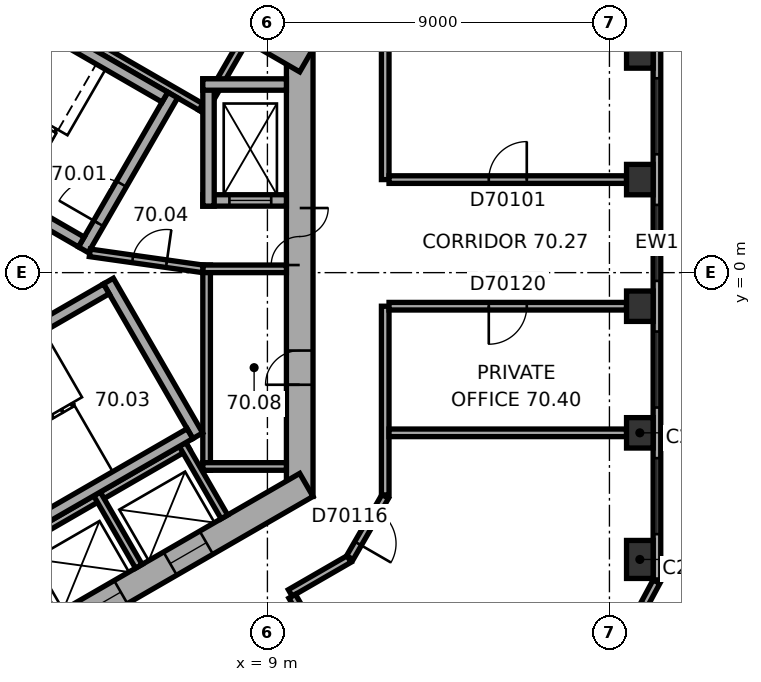
"""IFC4 building model, lengths in metres.
Left out: names, types, materials, properties, quantities, classifications, styles, units other than length and angle.
Written with IfcOpenShell. Run it as: python <this file> out.ifc"""

import sys

from ifc_helpers import new_model, si_unit, direction, frame, frame_2d, origin, origin_2d, place, context, subcontext, project, spatial, rectangle, extrude, element, fill, save


model = new_model("IFC4")
c1 = context("Model", 3, precision=1e-05, world=origin(), true_north=direction((0.0, 1.0)))
c2 = subcontext(c1, "Body", "Model", "MODEL_VIEW")
j1 = project(units=[si_unit("LENGTHUNIT", "METRE"), si_unit("PLANEANGLEUNIT", "RADIAN")], contexts=[c1])
p1 = place(None, origin())
s1 = spatial("IfcSite", under=j1, at=p1, CompositionType="ELEMENT")
p2 = place(p1, origin())
s2 = spatial("IfcBuilding", under=s1, at=p2, CompositionType="ELEMENT")
p3 = place(p2, frame((0.0, 0.0, 285.7)))
s3 = spatial("IfcBuildingStorey", under=s2, at=p3, CompositionType="ELEMENT", Elevation=285.7)
p4 = place(p3, frame((18.8, -7.547, 0.0), z_axis=(0.0, 0.0, 1.0), x_axis=(0.0, 1.0, 0.0)))
e1 = element("IfcColumn", 1, at=p4, inside=s3, PredefinedType="COLUMN", context=c2, shape_type="SweptSolid", body=[
    extrude(rectangle(XDim=1.0, YDim=0.7, at=origin_2d()), origin(), (0.0, 0.0, 1.0), 3.7),
])
for number, where, z_axis, x_axis in (
    (2, (18.8, -4.215, 0.0), (0.0, 0.0, 1.0), (0.0, 1.0, 0.0)),
    (3, (18.8, -0.883, 0.0), (0.0, 0.0, 1.0), (0.0, 1.0, 0.0)),
    (4, (18.8, 2.448, 0.0), (0.0, 0.0, 1.0), (0.0, 1.0, 0.0)),
    (5, (18.8, 5.78, 0.0), (0.0, 0.0, 1.0), (0.0, 1.0, 0.0)),
):
    element("IfcColumn", number, at=place(p3, frame(where, z_axis=z_axis, x_axis=x_axis)), inside=s3, PredefinedType="COLUMN", context=c2, shape_type="SweptSolid", body=[
        extrude(rectangle(XDim=0.8, YDim=0.7, at=origin_2d()), origin(), (0.0, 0.0, 1.0), 3.7),
    ])
p5 = place(p3, frame((9.85, -5.889, 0.0), z_axis=(0.0, 0.0, 1.0), x_axis=(0.0, 1.0, 0.0)))
e6 = element("IfcWall", 6, at=p5, inside=s3, PredefinedType="SHEAR", context=c2, shape_type="SweptSolid", body=[
    extrude(rectangle(XDim=11.778, YDim=0.7, at=frame_2d((5.889, 0.0))), origin(), (0.0, 0.0, 1.0), 3.7),
])
p6 = place(p5, frame((6.089, 0.0, 0.0)))
e7 = element("IfcOpeningElement", 7, at=p6, cuts=e6, PredefinedType="OPENING", context=c2, shape_type="SweptSolid", body=[
    extrude(rectangle(XDim=1.5, YDim=2.1, at=frame_2d((0.75, 1.05))), frame((0.0, 0.36, 0.0), z_axis=(0.0, -1.0, 0.0), x_axis=(1.0, 0.0, 0.0)), (0.0, 0.0, 1.0), 0.72),
])
p7 = place(p5, frame((2.939, 0.0, 0.0)))
e8 = element("IfcOpeningElement", 8, at=p7, cuts=e6, PredefinedType="OPENING", context=c2, shape_type="SweptSolid", body=[
    extrude(rectangle(XDim=0.9, YDim=2.1, at=frame_2d((0.45, 1.05))), frame((0.0, 0.36, 0.0), z_axis=(0.0, -1.0, 0.0), x_axis=(1.0, 0.0, 0.0)), (0.0, 0.0, 1.0), 0.72),
])
p8 = place(p3, frame((10.025, 5.586, 0.0), z_axis=(0.0, 0.0, 1.0), x_axis=(-0.866026453023, 0.499998182661, 0.0)))
e9 = element("IfcWall", 9, at=p8, inside=s3, PredefinedType="SHEAR", context=c2, shape_type="SweptSolid", body=[
    extrude(rectangle(XDim=11.778, YDim=0.7, at=frame_2d((5.889, 0.0))), origin(), (0.0, 0.0, 1.0), 3.7),
])
p9 = place(p8, frame((5.139, 0.0, 0.0)))
e10 = element("IfcOpeningElement", 10, at=p9, cuts=e9, PredefinedType="OPENING", context=c2, shape_type="SweptSolid", body=[
    extrude(rectangle(XDim=0.9, YDim=2.1, at=frame_2d((0.45, 1.05))), frame((0.0, 0.36, 0.0), z_axis=(0.0, -1.0, 0.0), x_axis=(1.0, 0.0, 0.0)), (0.0, 0.0, 1.0), 0.72),
])
p10 = place(p3, frame((-0.175, -11.475, 0.0), z_axis=(0.0, 0.0, 1.0), x_axis=(0.866026453023, 0.499998182661, 0.0)))
e11 = element("IfcWall", 11, at=p10, inside=s3, PredefinedType="SHEAR", context=c2, shape_type="SweptSolid", body=[
    extrude(rectangle(XDim=11.778, YDim=0.7, at=frame_2d((5.889, 0.0))), origin(), (0.0, 0.0, 1.0), 3.7),
])
p11 = place(p10, frame((2.439, 0.0, 0.0)))
e12 = element("IfcOpeningElement", 12, at=p11, cuts=e11, PredefinedType="OPENING", context=c2, shape_type="SweptSolid", body=[
    extrude(rectangle(XDim=1.1, YDim=2.1, at=frame_2d((0.55, 1.05))), frame((0.0, 0.36, 0.0), z_axis=(0.0, -1.0, 0.0), x_axis=(1.0, 0.0, 0.0)), (0.0, 0.0, 1.0), 0.72),
])
p12 = place(p10, frame((5.039, 0.0, 0.0)))
e13 = element("IfcOpeningElement", 13, at=p12, cuts=e11, PredefinedType="OPENING", context=c2, shape_type="SweptSolid", body=[
    extrude(rectangle(XDim=1.1, YDim=2.1, at=frame_2d((0.55, 1.05))), frame((0.0, 0.36, 0.0), z_axis=(0.0, -1.0, 0.0), x_axis=(1.0, 0.0, 0.0)), (0.0, 0.0, 1.0), 0.72),
])
p13 = place(p10, frame((7.639, 0.0, 0.0)))
e14 = element("IfcOpeningElement", 14, at=p13, cuts=e11, PredefinedType="OPENING", context=c2, shape_type="SweptSolid", body=[
    extrude(rectangle(XDim=1.1, YDim=2.1, at=frame_2d((0.55, 1.05))), frame((0.0, 0.36, 0.0), z_axis=(0.0, -1.0, 0.0), x_axis=(1.0, 0.0, 0.0)), (0.0, 0.0, 1.0), 0.72),
])
p14 = place(p3, frame((19.25, -8.084, 0.0), z_axis=(0.0, 0.0, 1.0), x_axis=(0.0, 1.0, 0.0)))
e15 = element("IfcWall", 15, at=p14, inside=s3, PredefinedType="STANDARD", context=c2, shape_type="SweptSolid", body=[
    extrude(rectangle(XDim=17.731, YDim=0.2, at=frame_2d((8.866, 0.0))), origin(), (0.0, 0.0, 1.0), 3.7),
])
p15 = place(p14, frame((1.203, 0.0, 0.9)))
e16 = element("IfcOpeningElement", 16, at=p15, cuts=e15, PredefinedType="OPENING", context=c2, shape_type="SweptSolid", body=[
    extrude(rectangle(XDim=2.0, YDim=2.0, at=frame_2d((1.0, 1.0))), frame((0.0, 0.11, 0.0), z_axis=(0.0, -1.0, 0.0), x_axis=(1.0, 0.0, 0.0)), (0.0, 0.0, 1.0), 0.22),
])
p16 = place(p14, frame((4.535, 0.0, 0.9)))
e17 = element("IfcOpeningElement", 17, at=p16, cuts=e15, PredefinedType="OPENING", context=c2, shape_type="SweptSolid", body=[
    extrude(rectangle(XDim=2.0, YDim=2.0, at=frame_2d((1.0, 1.0))), frame((0.0, 0.11, 0.0), z_axis=(0.0, -1.0, 0.0), x_axis=(1.0, 0.0, 0.0)), (0.0, 0.0, 1.0), 0.22),
])
p17 = place(p14, frame((7.866, 0.0, 0.9)))
e18 = element("IfcOpeningElement", 18, at=p17, cuts=e15, PredefinedType="OPENING", context=c2, shape_type="SweptSolid", body=[
    extrude(rectangle(XDim=2.0, YDim=2.0, at=frame_2d((1.0, 1.0))), frame((0.0, 0.11, 0.0), z_axis=(0.0, -1.0, 0.0), x_axis=(1.0, 0.0, 0.0)), (0.0, 0.0, 1.0), 0.22),
])
p18 = place(p14, frame((11.198, 0.0, 0.9)))
e19 = element("IfcOpeningElement", 19, at=p18, cuts=e15, PredefinedType="OPENING", context=c2, shape_type="SweptSolid", body=[
    extrude(rectangle(XDim=2.0, YDim=2.0, at=frame_2d((1.0, 1.0))), frame((0.0, 0.11, 0.0), z_axis=(0.0, -1.0, 0.0), x_axis=(1.0, 0.0, 0.0)), (0.0, 0.0, 1.0), 0.22),
])
p19 = place(p14, frame((14.53, 0.0, 0.9)))
e20 = element("IfcOpeningElement", 20, at=p19, cuts=e15, PredefinedType="OPENING", context=c2, shape_type="SweptSolid", body=[
    extrude(rectangle(XDim=2.0, YDim=2.0, at=frame_2d((1.0, 1.0))), frame((0.0, 0.11, 0.0), z_axis=(0.0, -1.0, 0.0), x_axis=(1.0, 0.0, 0.0)), (0.0, 0.0, 1.0), 0.22),
])
p20 = place(p3, frame((17.399, -11.554, 0.0), z_axis=(0.0, 0.0, 1.0), x_axis=(0.473309051311, 0.880896442238, 0.0)))
e21 = element("IfcWall", 21, at=p20, inside=s3, PredefinedType="STANDARD", context=c2, shape_type="SweptSolid", body=[
    extrude(rectangle(XDim=3.886, YDim=0.2, at=frame_2d((1.943, 0.0))), origin(), (0.0, 0.0, 1.0), 3.7),
])
p21 = place(p20, frame((0.643, 0.0, 0.9)))
e22 = element("IfcOpeningElement", 22, at=p21, cuts=e21, PredefinedType="OPENING", context=c2, shape_type="SweptSolid", body=[
    extrude(rectangle(XDim=2.6, YDim=2.0, at=frame_2d((1.3, 1.0))), frame((0.0, 0.11, 0.0), z_axis=(0.0, -1.0, 0.0), x_axis=(1.0, 0.0, 0.0)), (0.0, 0.0, 1.0), 0.22),
])
p22 = place(p3, frame((7.4, -5.2, 0.0), z_axis=(0.0, 0.0, 1.0), x_axis=(0.0, 1.0, 0.0)))
e23 = element("IfcWall", 23, at=p22, inside=s3, PredefinedType="PARTITIONING", context=c2, shape_type="SweptSolid", body=[
    extrude(rectangle(XDim=5.4, YDim=0.2, at=frame_2d((2.7, 0.0))), origin(), (0.0, 0.0, 1.0), 3.42),
])
for number, where, z_axis, x_axis in (
    (24, (7.3, -5.1, 0.0), (0.0, 0.0, 1.0), (1.0, 0.0, 0.0)),
    (25, (7.3, 0.1, 0.0), (0.0, 0.0, 1.0), (1.0, 0.0, 0.0)),
):
    element("IfcWall", number, at=place(p3, frame(where, z_axis=z_axis, x_axis=x_axis)), inside=s3, PredefinedType="PARTITIONING", context=c2, shape_type="SweptSolid", body=[
        extrude(rectangle(XDim=2.2, YDim=0.2, at=frame_2d((1.1, 0.0))), origin(), (0.0, 0.0, 1.0), 3.42),
    ])
p23 = place(p3, frame((7.424, 4.259, 0.0), z_axis=(0.0, 0.0, 1.0), x_axis=(-0.866026010844, 0.49999894854, 0.0)))
e26 = element("IfcWall", 26, at=p23, inside=s3, PredefinedType="PARTITIONING", context=c2, shape_type="SweptSolid", body=[
    extrude(rectangle(XDim=8.0, YDim=0.2, at=frame_2d((4.0, 0.0))), origin(), (0.0, 0.0, 1.0), 3.42),
])
p24 = place(p3, frame((7.287, 4.222, 0.0), z_axis=(0.0, 0.0, 1.0), x_axis=(0.499946605688, 0.86605622881, 0.0)))
e27 = element("IfcWall", 27, at=p24, inside=s3, PredefinedType="PARTITIONING", context=c2, shape_type="SweptSolid", body=[
    extrude(rectangle(XDim=2.2, YDim=0.2, at=frame_2d((1.1, 0.0))), origin(), (0.0, 0.0, 1.0), 3.42),
])
p25 = place(p3, frame((-0.024, -8.559, 0.0), z_axis=(0.0, 0.0, 1.0), x_axis=(0.866026010844, 0.49999894854, 0.0)))
e28 = element("IfcWall", 28, at=p25, inside=s3, PredefinedType="PARTITIONING", context=c2, shape_type="SweptSolid", body=[
    extrude(rectangle(XDim=8.0, YDim=0.2, at=frame_2d((4.0, 0.0))), origin(), (0.0, 0.0, 1.0), 3.42),
])
for number, where, z_axis, x_axis in (
    (29, (2.264, -7.122, 0.0), (0.0, 0.0, 1.0), (0.5, -0.866, 0.0)),
    (30, (4.516, -5.822, 0.0), (0.0, 0.0, 1.0), (0.5, -0.866, 0.0)),
    (31, (6.768, -4.522, 0.0), (0.0, 0.0, 1.0), (0.5, -0.866, 0.0)),
):
    element("IfcWall", number, at=place(p3, frame(where, z_axis=z_axis, x_axis=x_axis)), inside=s3, PredefinedType="PARTITIONING", context=c2, shape_type="SweptSolid", body=[
        extrude(rectangle(XDim=2.2, YDim=0.2, at=frame_2d((1.1, 0.0))), origin(), (0.0, 0.0, 1.0), 3.42),
    ])
p26 = place(p3, frame((4.158, 0.602, 0.0), z_axis=(0.0, 0.0, 1.0), x_axis=(0.499977259774, 0.866038532462, 0.0)))
e32 = element("IfcWall", 32, at=p26, inside=s3, PredefinedType="SHEAR", context=c2, shape_type="SweptSolid", body=[
    extrude(rectangle(XDim=4.7, YDim=0.3, at=frame_2d((2.35, 0.0))), origin(), (0.0, 0.0, 1.0), 3.42),
])
p27 = place(p26, frame((0.8, 0.0, 0.0)))
e33 = element("IfcOpeningElement", 33, at=p27, cuts=e32, PredefinedType="OPENING", context=c2, shape_type="SweptSolid", body=[
    extrude(rectangle(XDim=1.2, YDim=2.1, at=frame_2d((0.6, 1.05))), frame((0.0, 0.16, 0.0), z_axis=(0.0, -1.0, 0.0), x_axis=(1.0, 0.0, 0.0)), (0.0, 0.0, 1.0), 0.32),
])
for number, where, z_axis, x_axis in (
    (34, (4.103, 0.807, 0.0), (0.0, 0.0, 1.0), (-0.866, 0.5, 0.0)),
    (35, (6.303, 4.617, 0.0), (0.0, 0.0, 1.0), (-0.866, 0.5, 0.0)),
):
    element("IfcWall", number, at=place(p3, frame(where, z_axis=z_axis, x_axis=x_axis)), inside=s3, PredefinedType="SHEAR", context=c2, shape_type="SweptSolid", body=[
        extrude(rectangle(XDim=7.06, YDim=0.3, at=frame_2d((3.53, 0.0))), origin(), (0.0, 0.0, 1.0), 3.42),
    ])
p28 = place(p3, frame((4.816, -0.222, 0.0), z_axis=(0.0, 0.0, 1.0), x_axis=(0.499977259774, -0.866038532462, 0.0)))
e36 = element("IfcWall", 36, at=p28, inside=s3, PredefinedType="SHEAR", context=c2, shape_type="SweptSolid", body=[
    extrude(rectangle(XDim=4.7, YDim=0.3, at=frame_2d((2.35, 0.0))), origin(), (0.0, 0.0, 1.0), 3.42),
])
for number, where, z_axis, x_axis in (
    (37, (-1.353, -3.957, 0.0), (0.0, 0.0, 1.0), (0.866, 0.5, 0.0)),
    (38, (0.847, -7.767, 0.0), (0.0, 0.0, 1.0), (0.866, 0.5, 0.0)),
):
    element("IfcWall", number, at=place(p3, frame(where, z_axis=z_axis, x_axis=x_axis)), inside=s3, PredefinedType="SHEAR", context=c2, shape_type="SweptSolid", body=[
        extrude(rectangle(XDim=7.06, YDim=0.3, at=frame_2d((3.53, 0.0))), origin(), (0.0, 0.0, 1.0), 3.42),
    ])
p29 = place(p3, frame((7.3, 1.9, 0.0), z_axis=(0.0, 0.0, 1.0), x_axis=(1.0, 0.0, 0.0)))
e39 = element("IfcWall", 39, at=p29, inside=s3, PredefinedType="SHEAR", context=c2, shape_type="SweptSolid", body=[
    extrude(rectangle(XDim=2.2, YDim=0.3, at=frame_2d((1.1, 0.0))), origin(), (0.0, 0.0, 1.0), 3.42),
])
p30 = place(p29, frame((0.7, 0.0, 0.0)))
e40 = element("IfcOpeningElement", 40, at=p30, cuts=e39, PredefinedType="OPENING", context=c2, shape_type="SweptSolid", body=[
    extrude(rectangle(XDim=1.1, YDim=2.1, at=frame_2d((0.55, 1.05))), frame((0.0, 0.16, 0.0), z_axis=(0.0, -1.0, 0.0), x_axis=(1.0, 0.0, 0.0)), (0.0, 0.0, 1.0), 0.32),
])
p31 = place(p3, frame((7.45, 1.75, 0.0), z_axis=(0.0, 0.0, 1.0), x_axis=(0.0, 1.0, 0.0)))
e41 = element("IfcWall", 41, at=p31, inside=s3, PredefinedType="SHEAR", context=c2, shape_type="SweptSolid", body=[
    extrude(rectangle(XDim=3.35, YDim=0.3, at=frame_2d((1.675, 0.0))), origin(), (0.0, 0.0, 1.0), 3.42),
])
p32 = place(p3, frame((7.3, 4.95, 0.0), z_axis=(0.0, 0.0, 1.0), x_axis=(1.0, 0.0, 0.0)))
e42 = element("IfcWall", 42, at=p32, inside=s3, PredefinedType="SHEAR", context=c2, shape_type="SweptSolid", body=[
    extrude(rectangle(XDim=2.2, YDim=0.3, at=frame_2d((1.1, 0.0))), origin(), (0.0, 0.0, 1.0), 3.42),
])
p33 = place(p3, frame((4.327, 0.521, 0.0), z_axis=(0.0, 0.0, 1.0), x_axis=(0.990124376366, -0.14019172346, 0.0)))
e43 = element("IfcWall", 43, at=p33, inside=s3, PredefinedType="PARTITIONING", context=c2, shape_type="SweptSolid", body=[
    extrude(rectangle(XDim=3.002, YDim=0.2, at=frame_2d((1.501, 0.0))), origin(), (0.0, 0.0, 1.0), 3.42),
])
p34 = place(p33, frame((1.138, 0.0, 0.0)))
e44 = element("IfcOpeningElement", 44, at=p34, cuts=e43, PredefinedType="OPENING", context=c2, shape_type="SweptSolid", body=[
    extrude(rectangle(XDim=0.9, YDim=2.1, at=frame_2d((0.45, 1.05))), frame((0.0, 0.11, 0.0), z_axis=(0.0, -1.0, 0.0), x_axis=(1.0, 0.0, 0.0)), (0.0, 0.0, 1.0), 0.22),
])
p35 = place(p3, frame((9.602, -8.428, 0.0), z_axis=(0.0, 0.0, 1.0), x_axis=(0.865999114786, 0.500045531117, 0.0)))
e45 = element("IfcWall", 45, at=p35, inside=s3, PredefinedType="PARTITIONING", context=c2, shape_type="SweptSolid", body=[
    extrude(rectangle(XDim=1.788, YDim=0.2, at=frame_2d((0.894, 0.0))), origin(), (0.0, 0.0, 1.0), 3.42),
])
p36 = place(p3, frame((10.152, -9.382, 0.0), z_axis=(0.0, 0.0, 1.0), x_axis=(-0.499968756647, 0.866043441391, 0.0)))
e46 = element("IfcWall", 46, at=p36, inside=s3, PredefinedType="PARTITIONING", context=c2, shape_type="SweptSolid", body=[
    extrude(rectangle(XDim=1.001, YDim=0.2, at=frame_2d((0.5, 0.0))), origin(), (0.0, 0.0, 1.0), 3.42),
])
p37 = place(p3, frame((11.17, -7.5, 0.0), z_axis=(0.0, 0.0, 1.0), x_axis=(0.500006454166, 0.866021677438, 0.0)))
e47 = element("IfcWall", 47, at=p37, inside=s3, PredefinedType="PARTITIONING", context=c2, shape_type="SweptSolid", body=[
    extrude(rectangle(XDim=1.86, YDim=0.2, at=frame_2d((0.93, 0.0))), origin(), (0.0, 0.0, 1.0), 3.42),
])
p38 = place(p37, frame((0.43, 0.0, 0.0)))
e48 = element("IfcOpeningElement", 48, at=p38, cuts=e47, PredefinedType="OPENING", context=c2, shape_type="SweptSolid", body=[
    extrude(rectangle(XDim=1.0, YDim=2.1, at=frame_2d((0.5, 1.05))), frame((0.0, 0.11, 0.0), z_axis=(0.0, -1.0, 0.0), x_axis=(1.0, 0.0, 0.0)), (0.0, 0.0, 1.0), 0.22),
])
p39 = place(p3, frame((12.1, -5.849, 0.0), z_axis=(0.0, 0.0, 1.0), x_axis=(0.0, 1.0, 0.0)))
e49 = element("IfcWall", 49, at=p39, inside=s3, PredefinedType="PARTITIONING", context=c2, shape_type="SweptSolid", body=[
    extrude(rectangle(XDim=4.966, YDim=0.2, at=frame_2d((2.483, 0.0))), origin(), (0.0, 0.0, 1.0), 3.42),
])
p40 = place(p3, frame((12.1, 2.448, 0.0), z_axis=(0.0, 0.0, 1.0), x_axis=(0.0, 1.0, 0.0)))
e50 = element("IfcWall", 50, at=p40, inside=s3, PredefinedType="PARTITIONING", context=c2, shape_type="SweptSolid", body=[
    extrude(rectangle(XDim=3.441, YDim=0.2, at=frame_2d((1.72, 0.0))), origin(), (0.0, 0.0, 1.0), 3.42),
])
p41 = place(p3, frame((12.2, -0.883, 0.0), z_axis=(0.0, 0.0, 1.0), x_axis=(1.0, 0.0, 0.0)))
e51 = element("IfcWall", 51, at=p41, inside=s3, PredefinedType="PARTITIONING", context=c2, shape_type="SweptSolid", body=[
    extrude(rectangle(XDim=6.25, YDim=0.2, at=frame_2d((3.125, 0.0))), origin(), (0.0, 0.0, 1.0), 2.87),
])
p42 = place(p41, frame((2.625, 0.0, 0.0)))
e52 = element("IfcOpeningElement", 52, at=p42, cuts=e51, PredefinedType="OPENING", context=c2, shape_type="SweptSolid", body=[
    extrude(rectangle(XDim=1.0, YDim=2.1, at=frame_2d((0.5, 1.05))), frame((0.0, 0.11, 0.0), z_axis=(0.0, -1.0, 0.0), x_axis=(1.0, 0.0, 0.0)), (0.0, 0.0, 1.0), 0.22),
])
p43 = place(p3, frame((18.45, -4.215, 0.0), z_axis=(0.0, 0.0, 1.0), x_axis=(-1.0, 0.0, 0.0)))
e53 = element("IfcWall", 53, at=p43, inside=s3, PredefinedType="PARTITIONING", context=c2, shape_type="SweptSolid", body=[
    extrude(rectangle(XDim=6.25, YDim=0.2, at=frame_2d((3.125, 0.0))), origin(), (0.0, 0.0, 1.0), 3.42),
])
p44 = place(p3, frame((18.45, 2.448, 0.0), z_axis=(0.0, 0.0, 1.0), x_axis=(-1.0, 0.0, 0.0)))
e54 = element("IfcWall", 54, at=p44, inside=s3, PredefinedType="PARTITIONING", context=c2, shape_type="SweptSolid", body=[
    extrude(rectangle(XDim=6.25, YDim=0.2, at=frame_2d((3.125, 0.0))), origin(), (0.0, 0.0, 1.0), 3.42),
])
p45 = place(p44, frame((2.625, 0.0, 0.0)))
e55 = element("IfcOpeningElement", 55, at=p45, cuts=e54, PredefinedType="OPENING", context=c2, shape_type="SweptSolid", body=[
    extrude(rectangle(XDim=1.0, YDim=2.1, at=frame_2d((0.5, 1.05))), frame((0.0, 0.11, 0.0), z_axis=(0.0, -1.0, 0.0), x_axis=(1.0, 0.0, 0.0)), (0.0, 0.0, 1.0), 0.22),
])
p46 = place(p15, origin())
e56 = element("IfcWindow", 56, at=p46, inside=s3, PartitioningType="SINGLE_PANEL", PredefinedType="WINDOW", context=c2, shape_type="SweptSolid", body=[
    extrude(rectangle(XDim=2.0, YDim=2.0, at=frame_2d((1.0, 1.0))), frame((0.0, 0.03, 0.0), z_axis=(0.0, -1.0, 0.0), x_axis=(1.0, 0.0, 0.0)), (0.0, 0.0, 1.0), 0.06),
])
fill(e16, e56)
p47 = place(p16, origin())
e57 = element("IfcWindow", 57, at=p47, inside=s3, PartitioningType="SINGLE_PANEL", PredefinedType="WINDOW", context=c2, shape_type="SweptSolid", body=[
    extrude(rectangle(XDim=2.0, YDim=2.0, at=frame_2d((1.0, 1.0))), frame((0.0, 0.03, 0.0), z_axis=(0.0, -1.0, 0.0), x_axis=(1.0, 0.0, 0.0)), (0.0, 0.0, 1.0), 0.06),
])
fill(e17, e57)
p48 = place(p17, origin())
e58 = element("IfcWindow", 58, at=p48, inside=s3, PartitioningType="SINGLE_PANEL", PredefinedType="WINDOW", context=c2, shape_type="SweptSolid", body=[
    extrude(rectangle(XDim=2.0, YDim=2.0, at=frame_2d((1.0, 1.0))), frame((0.0, 0.03, 0.0), z_axis=(0.0, -1.0, 0.0), x_axis=(1.0, 0.0, 0.0)), (0.0, 0.0, 1.0), 0.06),
])
fill(e18, e58)
p49 = place(p18, origin())
e59 = element("IfcWindow", 59, at=p49, inside=s3, PartitioningType="SINGLE_PANEL", PredefinedType="WINDOW", context=c2, shape_type="SweptSolid", body=[
    extrude(rectangle(XDim=2.0, YDim=2.0, at=frame_2d((1.0, 1.0))), frame((0.0, 0.03, 0.0), z_axis=(0.0, -1.0, 0.0), x_axis=(1.0, 0.0, 0.0)), (0.0, 0.0, 1.0), 0.06),
])
fill(e19, e59)
p50 = place(p6, origin())
e60 = element("IfcDoor", 60, at=p50, inside=s3, OperationType="DOUBLE_DOOR_SINGLE_SWING", PredefinedType="DOOR", context=c2, shape_type="SweptSolid", body=[
    extrude(rectangle(XDim=1.5, YDim=2.1, at=frame_2d((0.75, 1.05))), frame((0.0, 0.025, 0.0), z_axis=(0.0, -1.0, 0.0), x_axis=(1.0, 0.0, 0.0)), (0.0, 0.0, 1.0), 0.05),
])
fill(e7, e60)
p51 = place(p27, origin())
e61 = element("IfcDoor", 61, at=p51, inside=s3, OperationType="SINGLE_SWING_RIGHT", PredefinedType="DOOR", context=c2, shape_type="SweptSolid", body=[
    extrude(rectangle(XDim=1.2, YDim=2.1, at=frame_2d((0.6, 1.05))), frame((0.0, 0.025, 0.0), z_axis=(0.0, -1.0, 0.0), x_axis=(1.0, 0.0, 0.0)), (0.0, 0.0, 1.0), 0.05),
])
fill(e33, e61)
p52 = place(p34, origin())
e62 = element("IfcDoor", 62, at=p52, inside=s3, OperationType="SINGLE_SWING_LEFT", PredefinedType="DOOR", context=c2, shape_type="SweptSolid", body=[
    extrude(rectangle(XDim=0.9, YDim=2.1, at=frame_2d((0.45, 1.05))), frame((0.0, 0.025, 0.0), z_axis=(0.0, -1.0, 0.0), x_axis=(1.0, 0.0, 0.0)), (0.0, 0.0, 1.0), 0.05),
])
fill(e44, e62)
p53 = place(p7, origin())
e63 = element("IfcDoor", 63, at=p53, inside=s3, OperationType="SINGLE_SWING_LEFT", PredefinedType="DOOR", context=c2, shape_type="SweptSolid", body=[
    extrude(rectangle(XDim=0.9, YDim=2.1, at=frame_2d((0.45, 1.05))), frame((0.0, 0.025, 0.0), z_axis=(0.0, -1.0, 0.0), x_axis=(1.0, 0.0, 0.0)), (0.0, 0.0, 1.0), 0.05),
])
fill(e8, e63)
p54 = place(p30, origin())
e64 = element("IfcDoor", 64, at=p54, inside=s3, OperationType="DOUBLE_DOOR_SLIDING", PredefinedType="DOOR", context=c2, shape_type="SweptSolid", body=[
    extrude(rectangle(XDim=1.1, YDim=2.1, at=frame_2d((0.55, 1.05))), frame((0.0, 0.025, 0.0), z_axis=(0.0, -1.0, 0.0), x_axis=(1.0, 0.0, 0.0)), (0.0, 0.0, 1.0), 0.05),
])
fill(e40, e64)
p55 = place(p12, origin())
e65 = element("IfcDoor", 65, at=p55, inside=s3, OperationType="DOUBLE_DOOR_SLIDING", PredefinedType="DOOR", context=c2, shape_type="SweptSolid", body=[
    extrude(rectangle(XDim=1.1, YDim=2.1, at=frame_2d((0.55, 1.05))), frame((0.0, 0.025, 0.0), z_axis=(0.0, -1.0, 0.0), x_axis=(1.0, 0.0, 0.0)), (0.0, 0.0, 1.0), 0.05),
])
fill(e13, e65)
p56 = place(p13, origin())
e66 = element("IfcDoor", 66, at=p56, inside=s3, OperationType="DOUBLE_DOOR_SLIDING", PredefinedType="DOOR", context=c2, shape_type="SweptSolid", body=[
    extrude(rectangle(XDim=1.1, YDim=2.1, at=frame_2d((0.55, 1.05))), frame((0.0, 0.025, 0.0), z_axis=(0.0, -1.0, 0.0), x_axis=(1.0, 0.0, 0.0)), (0.0, 0.0, 1.0), 0.05),
])
fill(e14, e66)
p57 = place(p45, origin())
e67 = element("IfcDoor", 67, at=p57, inside=s3, OperationType="SINGLE_SWING_LEFT", PredefinedType="DOOR", context=c2, shape_type="SweptSolid", body=[
    extrude(rectangle(XDim=1.0, YDim=2.1, at=frame_2d((0.5, 1.05))), frame((0.0, 0.025, 0.0), z_axis=(0.0, -1.0, 0.0), x_axis=(1.0, 0.0, 0.0)), (0.0, 0.0, 1.0), 0.05),
])
fill(e55, e67)
p58 = place(p38, origin())
e68 = element("IfcDoor", 68, at=p58, inside=s3, OperationType="SINGLE_SWING_LEFT", PredefinedType="DOOR", context=c2, shape_type="SweptSolid", body=[
    extrude(rectangle(XDim=1.0, YDim=2.1, at=frame_2d((0.5, 1.05))), frame((0.0, 0.025, 0.0), z_axis=(0.0, -1.0, 0.0), x_axis=(1.0, 0.0, 0.0)), (0.0, 0.0, 1.0), 0.05),
])
fill(e48, e68)
p59 = place(p42, origin())
e69 = element("IfcDoor", 69, at=p59, inside=s3, OperationType="SINGLE_SWING_LEFT", PredefinedType="DOOR", context=c2, shape_type="SweptSolid", body=[
    extrude(rectangle(XDim=1.0, YDim=2.1, at=frame_2d((0.5, 1.05))), frame((0.0, 0.025, 0.0), z_axis=(0.0, -1.0, 0.0), x_axis=(1.0, 0.0, 0.0)), (0.0, 0.0, 1.0), 0.05),
])
fill(e52, e69)
save(model, sys.argv[1])
